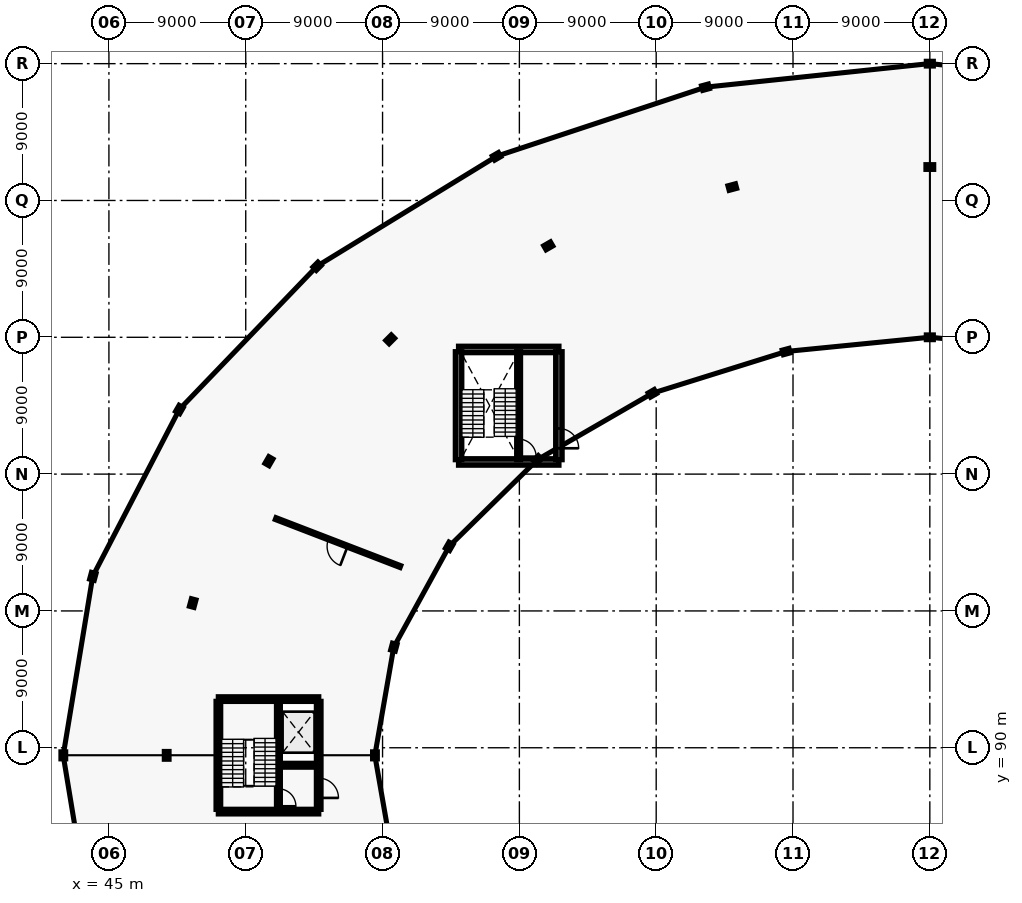
"""IFC4 building model, lengths in metres.
Left out: names, types, materials, properties, quantities, classifications, styles, units other than length and angle.
Written with IfcOpenShell. Run it as: python <this file> out.ifc"""

import sys

from ifc_helpers import new_model, si_unit, direction, frame, frame_2d, origin, origin_2d, place, context, subcontext, project, spatial, rectangle, i_section, extrude, element, fill, save


model = new_model("IFC4")
c1 = context("Model", 3, precision=1e-05, world=origin(), true_north=direction((0.0, 1.0)))
c2 = subcontext(c1, "Body", "Model", "MODEL_VIEW")
j1 = project(units=[si_unit("LENGTHUNIT", "METRE"), si_unit("PLANEANGLEUNIT", "RADIAN")], contexts=[c1])
p1 = place(None, origin())
s1 = spatial("IfcSite", under=j1, at=p1, CompositionType="ELEMENT")
p2 = place(p1, origin())
s2 = spatial("IfcBuilding", under=s1, at=p2, CompositionType="ELEMENT")
p3 = place(p2, frame((0.0, 0.0, 5.4)))
s3 = spatial("IfcBuildingStorey", under=s2, at=p3, CompositionType="ELEMENT", Elevation=5.4)
p4 = place(p3, frame((99.0, 117.0, 0.0), z_axis=(0.0, 0.0, 1.0), x_axis=(0.0, 1.0, 0.0)))
e1 = element("IfcColumn", 1, at=p4, inside=s3, PredefinedType="COLUMN", context=c2, shape_type="SweptSolid", body=[
    extrude(i_section(OverallWidth=0.3, OverallDepth=0.45, WebThickness=0.014, FlangeThickness=0.026, FilletRadius=0.027, at=origin_2d()), origin(), (0.0, 0.0, 1.0), 4.2),
])
p5 = place(p3, frame((99.0, 128.2, 0.0), z_axis=(0.0, 0.0, 1.0), x_axis=(0.0, 1.0, 0.0)))
e2 = element("IfcColumn", 2, at=p5, inside=s3, PredefinedType="COLUMN", context=c2, shape_type="SweptSolid", body=[
    extrude(i_section(OverallWidth=0.3, OverallDepth=0.5, WebThickness=0.014, FlangeThickness=0.028, FilletRadius=0.027, at=origin_2d()), origin(), (0.0, 0.0, 1.0), 4.2),
])
p6 = place(p3, frame((99.0, 135.0, 0.0), z_axis=(0.0, 0.0, 1.0), x_axis=(0.0, 1.0, 0.0)))
e3 = element("IfcColumn", 3, at=p6, inside=s3, PredefinedType="COLUMN", context=c2, shape_type="SweptSolid", body=[
    extrude(i_section(OverallWidth=0.3, OverallDepth=0.45, WebThickness=0.014, FlangeThickness=0.026, FilletRadius=0.027, at=origin_2d()), origin(), (0.0, 0.0, 1.0), 4.18),
])
p7 = place(p3, frame((89.553, 116.063, 0.0), z_axis=(0.0, 0.0, 1.0), x_axis=(-0.258819045103, 0.965925826289, 0.0)))
e4 = element("IfcColumn", 4, at=p7, inside=s3, PredefinedType="COLUMN", context=c2, shape_type="SweptSolid", body=[
    extrude(i_section(OverallWidth=0.3, OverallDepth=0.45, WebThickness=0.014, FlangeThickness=0.026, FilletRadius=0.027, at=origin_2d()), origin(), (0.0, 0.0, 1.0), 4.2),
])
p8 = place(p3, frame((86.007, 126.881, 0.0), z_axis=(0.0, 0.0, 1.0), x_axis=(-0.258819045103, 0.965925826289, 0.0)))
e5 = element("IfcColumn", 5, at=p8, inside=s3, PredefinedType="COLUMN", context=c2, shape_type="SweptSolid", body=[
    extrude(i_section(OverallWidth=0.3, OverallDepth=0.5, WebThickness=0.014, FlangeThickness=0.028, FilletRadius=0.027, at=origin_2d()), origin(), (0.0, 0.0, 1.0), 4.2),
])
p9 = place(p3, frame((84.247, 133.45, 0.0), z_axis=(0.0, 0.0, 1.0), x_axis=(-0.258819045103, 0.965925826289, 0.0)))
e6 = element("IfcColumn", 6, at=p9, inside=s3, PredefinedType="COLUMN", context=c2, shape_type="SweptSolid", body=[
    extrude(i_section(OverallWidth=0.3, OverallDepth=0.45, WebThickness=0.014, FlangeThickness=0.026, FilletRadius=0.027, at=origin_2d()), origin(), (0.0, 0.0, 1.0), 4.18),
])
p10 = place(p3, frame((80.75, 113.316, 0.0), z_axis=(0.0, 0.0, 1.0), x_axis=(-0.5, 0.866025403784, 0.0)))
e7 = element("IfcColumn", 7, at=p10, inside=s3, PredefinedType="COLUMN", context=c2, shape_type="SweptSolid", body=[
    extrude(i_section(OverallWidth=0.3, OverallDepth=0.45, WebThickness=0.014, FlangeThickness=0.026, FilletRadius=0.027, at=origin_2d()), origin(), (0.0, 0.0, 1.0), 4.2),
])
p11 = place(p3, frame((73.9, 123.015, 0.0), z_axis=(0.0, 0.0, 1.0), x_axis=(-0.5, 0.866025403784, 0.0)))
e8 = element("IfcColumn", 8, at=p11, inside=s3, PredefinedType="COLUMN", context=c2, shape_type="SweptSolid", body=[
    extrude(i_section(OverallWidth=0.3, OverallDepth=0.5, WebThickness=0.014, FlangeThickness=0.028, FilletRadius=0.027, at=origin_2d()), origin(), (0.0, 0.0, 1.0), 4.2),
])
p12 = place(p3, frame((70.5, 128.904, 0.0), z_axis=(0.0, 0.0, 1.0), x_axis=(-0.5, 0.866025403784, 0.0)))
e9 = element("IfcColumn", 9, at=p12, inside=s3, PredefinedType="COLUMN", context=c2, shape_type="SweptSolid", body=[
    extrude(i_section(OverallWidth=0.3, OverallDepth=0.45, WebThickness=0.014, FlangeThickness=0.026, FilletRadius=0.027, at=origin_2d()), origin(), (0.0, 0.0, 1.0), 4.18),
])
p13 = place(p3, frame((73.191, 108.945, 0.0), z_axis=(0.0, 0.0, 1.0), x_axis=(-0.707106781187, 0.707106781187, 0.0)))
e10 = element("IfcColumn", 10, at=p13, inside=s3, PredefinedType="COLUMN", context=c2, shape_type="SweptSolid", body=[
    extrude(i_section(OverallWidth=0.3, OverallDepth=0.45, WebThickness=0.014, FlangeThickness=0.026, FilletRadius=0.027, at=origin_2d()), origin(), (0.0, 0.0, 1.0), 4.2),
])
p14 = place(p3, frame((63.503, 116.865, 0.0), z_axis=(0.0, 0.0, 1.0), x_axis=(-0.707106781187, 0.707106781187, 0.0)))
e11 = element("IfcColumn", 11, at=p14, inside=s3, PredefinedType="COLUMN", context=c2, shape_type="SweptSolid", body=[
    extrude(i_section(OverallWidth=0.3, OverallDepth=0.5, WebThickness=0.014, FlangeThickness=0.028, FilletRadius=0.027, at=origin_2d()), origin(), (0.0, 0.0, 1.0), 4.2),
])
p15 = place(p3, frame((58.695, 121.673, 0.0), z_axis=(0.0, 0.0, 1.0), x_axis=(-0.707106781187, 0.707106781187, 0.0)))
e12 = element("IfcColumn", 12, at=p15, inside=s3, PredefinedType="COLUMN", context=c2, shape_type="SweptSolid", body=[
    extrude(i_section(OverallWidth=0.3, OverallDepth=0.45, WebThickness=0.014, FlangeThickness=0.026, FilletRadius=0.027, at=origin_2d()), origin(), (0.0, 0.0, 1.0), 4.18),
])
p16 = place(p3, frame((67.39, 103.25, 0.0), z_axis=(0.0, 0.0, 1.0), x_axis=(-0.866025403784, 0.5, 0.0)))
e13 = element("IfcColumn", 13, at=p16, inside=s3, PredefinedType="COLUMN", context=c2, shape_type="SweptSolid", body=[
    extrude(i_section(OverallWidth=0.3, OverallDepth=0.45, WebThickness=0.014, FlangeThickness=0.026, FilletRadius=0.027, at=origin_2d()), origin(), (0.0, 0.0, 1.0), 4.2),
])
p17 = place(p3, frame((55.526, 108.85, 0.0), z_axis=(0.0, 0.0, 1.0), x_axis=(-0.866025403784, 0.5, 0.0)))
e14 = element("IfcColumn", 14, at=p17, inside=s3, PredefinedType="COLUMN", context=c2, shape_type="SweptSolid", body=[
    extrude(i_section(OverallWidth=0.3, OverallDepth=0.5, WebThickness=0.014, FlangeThickness=0.028, FilletRadius=0.027, at=origin_2d()), origin(), (0.0, 0.0, 1.0), 4.2),
])
p18 = place(p3, frame((49.637, 112.25, 0.0), z_axis=(0.0, 0.0, 1.0), x_axis=(-0.866025403784, 0.5, 0.0)))
e15 = element("IfcColumn", 15, at=p18, inside=s3, PredefinedType="COLUMN", context=c2, shape_type="SweptSolid", body=[
    extrude(i_section(OverallWidth=0.3, OverallDepth=0.45, WebThickness=0.014, FlangeThickness=0.026, FilletRadius=0.027, at=origin_2d()), origin(), (0.0, 0.0, 1.0), 4.18),
])
p19 = place(p3, frame((63.744, 96.618, 0.0), z_axis=(0.0, 0.0, 1.0), x_axis=(-0.965925826289, 0.258819045103, 0.0)))
e16 = element("IfcColumn", 16, at=p19, inside=s3, PredefinedType="COLUMN", context=c2, shape_type="SweptSolid", body=[
    extrude(i_section(OverallWidth=0.3, OverallDepth=0.45, WebThickness=0.014, FlangeThickness=0.026, FilletRadius=0.027, at=origin_2d()), origin(), (0.0, 0.0, 1.0), 4.2),
])
p20 = place(p3, frame((50.511, 99.516, 0.0), z_axis=(0.0, 0.0, 1.0), x_axis=(-0.965925826289, 0.258819045103, 0.0)))
e17 = element("IfcColumn", 17, at=p20, inside=s3, PredefinedType="COLUMN", context=c2, shape_type="SweptSolid", body=[
    extrude(i_section(OverallWidth=0.3, OverallDepth=0.5, WebThickness=0.014, FlangeThickness=0.028, FilletRadius=0.027, at=origin_2d()), origin(), (0.0, 0.0, 1.0), 4.2),
])
p21 = place(p3, frame((43.942, 101.276, 0.0), z_axis=(0.0, 0.0, 1.0), x_axis=(-0.965925826289, 0.258819045103, 0.0)))
e18 = element("IfcColumn", 18, at=p21, inside=s3, PredefinedType="COLUMN", context=c2, shape_type="SweptSolid", body=[
    extrude(i_section(OverallWidth=0.3, OverallDepth=0.45, WebThickness=0.014, FlangeThickness=0.026, FilletRadius=0.027, at=origin_2d()), origin(), (0.0, 0.0, 1.0), 4.18),
])
p22 = place(p3, frame((62.5, 89.5, 0.0), z_axis=(0.0, 0.0, 1.0), x_axis=(-1.0, 0.0, 0.0)))
e19 = element("IfcColumn", 19, at=p22, inside=s3, PredefinedType="COLUMN", context=c2, shape_type="SweptSolid", body=[
    extrude(i_section(OverallWidth=0.3, OverallDepth=0.45, WebThickness=0.014, FlangeThickness=0.026, FilletRadius=0.027, at=origin_2d()), origin(), (0.0, 0.0, 1.0), 4.2),
])
p23 = place(p3, frame((48.8, 89.5, 0.0), z_axis=(0.0, 0.0, 1.0), x_axis=(-1.0, 0.0, 0.0)))
e20 = element("IfcColumn", 20, at=p23, inside=s3, PredefinedType="COLUMN", context=c2, shape_type="SweptSolid", body=[
    extrude(i_section(OverallWidth=0.3, OverallDepth=0.5, WebThickness=0.014, FlangeThickness=0.028, FilletRadius=0.027, at=origin_2d()), origin(), (0.0, 0.0, 1.0), 4.2),
])
p24 = place(p3, frame((42.0, 89.5, 0.0), z_axis=(0.0, 0.0, 1.0), x_axis=(-1.0, 0.0, 0.0)))
e21 = element("IfcColumn", 21, at=p24, inside=s3, PredefinedType="COLUMN", context=c2, shape_type="SweptSolid", body=[
    extrude(i_section(OverallWidth=0.3, OverallDepth=0.45, WebThickness=0.014, FlangeThickness=0.026, FilletRadius=0.027, at=origin_2d()), origin(), (0.0, 0.0, 1.0), 4.18),
])
for number, where, z_axis, x_axis in (
    (22, (52.2, 85.8, 0.0), (0.0, 0.0, 1.0), (1.0, 0.0, 0.0)),
    (23, (52.2, 93.2, 0.0), (0.0, 0.0, 1.0), (1.0, 0.0, 0.0)),
):
    element("IfcWall", number, at=place(p3, frame(where, z_axis=z_axis, x_axis=x_axis)), inside=s3, PredefinedType="SHEAR", context=c2, shape_type="SweptSolid", body=[
        extrude(rectangle(XDim=6.6, YDim=0.3, at=frame_2d((3.3, 0.0))), origin(), (0.0, 0.0, 1.0), 4.2),
    ])
p25 = place(p3, frame((52.2, 85.95, 0.0), z_axis=(0.0, 0.0, 1.0), x_axis=(0.0, 1.0, 0.0)))
e24 = element("IfcWall", 24, at=p25, inside=s3, PredefinedType="SHEAR", context=c2, shape_type="SweptSolid", body=[
    extrude(rectangle(XDim=7.1, YDim=0.3, at=frame_2d((3.55, 0.0))), origin(), (0.0, 0.0, 1.0), 4.2),
])
p26 = place(p3, frame((58.8, 85.95, 0.0), z_axis=(0.0, 0.0, 1.0), x_axis=(0.0, 1.0, 0.0)))
e25 = element("IfcWall", 25, at=p26, inside=s3, PredefinedType="SHEAR", context=c2, shape_type="SweptSolid", body=[
    extrude(rectangle(XDim=7.1, YDim=0.3, at=frame_2d((3.55, 0.0))), origin(), (0.0, 0.0, 1.0), 4.2),
])
p27 = place(p26, frame((0.75, 0.0, 0.0)))
e26 = element("IfcOpeningElement", 26, at=p27, cuts=e25, PredefinedType="OPENING", context=c2, shape_type="SweptSolid", body=[
    extrude(rectangle(XDim=1.3, YDim=2.15, at=frame_2d((0.65, 1.075))), frame((0.0, 0.16, 0.0), z_axis=(0.0, -1.0, 0.0), x_axis=(1.0, 0.0, 0.0)), (0.0, 0.0, 1.0), 0.32),
])
p28 = place(p3, frame((56.15, 85.95, 0.0), z_axis=(0.0, 0.0, 1.0), x_axis=(0.0, 1.0, 0.0)))
e27 = element("IfcWall", 27, at=p28, inside=s3, PredefinedType="SHEAR", context=c2, shape_type="SweptSolid", body=[
    extrude(rectangle(XDim=7.1, YDim=0.25, at=frame_2d((3.55, 0.0))), origin(), (0.0, 0.0, 1.0), 4.2),
])
p29 = place(p28, frame((0.2, 0.0, 0.0)))
e28 = element("IfcOpeningElement", 28, at=p29, cuts=e27, PredefinedType="OPENING", context=c2, shape_type="SweptSolid", body=[
    extrude(rectangle(XDim=1.15, YDim=2.15, at=frame_2d((0.575, 1.075))), frame((0.0, 0.135, 0.0), z_axis=(0.0, -1.0, 0.0), x_axis=(1.0, 0.0, 0.0)), (0.0, 0.0, 1.0), 0.27),
])
p30 = place(p3, frame((56.27, 88.85, 0.0), z_axis=(0.0, 0.0, 1.0), x_axis=(1.0, 0.0, 0.0)))
e29 = element("IfcWall", 29, at=p30, inside=s3, PredefinedType="SHEAR", context=c2, shape_type="SweptSolid", body=[
    extrude(rectangle(XDim=2.38, YDim=0.25, at=frame_2d((1.19, 0.0))), origin(), (0.0, 0.0, 1.0), 4.2),
])
p31 = place(p30, frame((0.39, 0.0, 0.0)))
e30 = element("IfcOpeningElement", 30, at=p31, cuts=e29, PredefinedType="OPENING", context=c2, shape_type="SweptSolid", body=[
    extrude(rectangle(XDim=1.6, YDim=2.3, at=frame_2d((0.8, 1.15))), frame((0.0, 0.135, 0.0), z_axis=(0.0, -1.0, 0.0), x_axis=(1.0, 0.0, 0.0)), (0.0, 0.0, 1.0), 0.27),
])
for number, where, z_axis, x_axis in (
    (31, (68.0, 108.8, 0.0), (0.0, 0.0, 1.0), (1.0, 0.0, 0.0)),
    (32, (68.0, 116.2, 0.0), (0.0, 0.0, 1.0), (1.0, 0.0, 0.0)),
):
    element("IfcWall", number, at=place(p3, frame(where, z_axis=z_axis, x_axis=x_axis)), inside=s3, PredefinedType="SHEAR", context=c2, shape_type="SweptSolid", body=[
        extrude(rectangle(XDim=6.6, YDim=0.42, at=frame_2d((3.3, 0.0))), origin(), (0.0, 0.0, 1.0), 4.2),
    ])
p32 = place(p3, frame((68.0, 108.95, 0.0), z_axis=(0.0, 0.0, 1.0), x_axis=(0.0, 1.0, 0.0)))
e33 = element("IfcWall", 33, at=p32, inside=s3, PredefinedType="SHEAR", context=c2, shape_type="SweptSolid", body=[
    extrude(rectangle(XDim=7.1, YDim=0.42, at=frame_2d((3.55, 0.0))), origin(), (0.0, 0.0, 1.0), 4.2),
])
p33 = place(p3, frame((74.6, 108.95, 0.0), z_axis=(0.0, 0.0, 1.0), x_axis=(0.0, 1.0, 0.0)))
e34 = element("IfcWall", 34, at=p33, inside=s3, PredefinedType="SHEAR", context=c2, shape_type="SweptSolid", body=[
    extrude(rectangle(XDim=7.1, YDim=0.42, at=frame_2d((3.55, 0.0))), origin(), (0.0, 0.0, 1.0), 4.2),
])
p34 = place(p33, frame((0.75, 0.0, 0.0)))
e35 = element("IfcOpeningElement", 35, at=p34, cuts=e34, PredefinedType="OPENING", context=c2, shape_type="SweptSolid", body=[
    extrude(rectangle(XDim=1.3, YDim=2.15, at=frame_2d((0.65, 1.075))), frame((0.0, 0.22, 0.0), z_axis=(0.0, -1.0, 0.0), x_axis=(1.0, 0.0, 0.0)), (0.0, 0.0, 1.0), 0.44),
])
p35 = place(p3, frame((71.95, 108.95, 0.0), z_axis=(0.0, 0.0, 1.0), x_axis=(0.0, 1.0, 0.0)))
e36 = element("IfcWall", 36, at=p35, inside=s3, PredefinedType="SHEAR", context=c2, shape_type="SweptSolid", body=[
    extrude(rectangle(XDim=7.1, YDim=0.25, at=frame_2d((3.55, 0.0))), origin(), (0.0, 0.0, 1.0), 4.2),
])
p36 = place(p35, frame((0.2, 0.0, 0.0)))
e37 = element("IfcOpeningElement", 37, at=p36, cuts=e36, PredefinedType="OPENING", context=c2, shape_type="SweptSolid", body=[
    extrude(rectangle(XDim=1.15, YDim=2.15, at=frame_2d((0.575, 1.075))), frame((0.0, 0.135, 0.0), z_axis=(0.0, -1.0, 0.0), x_axis=(1.0, 0.0, 0.0)), (0.0, 0.0, 1.0), 0.27),
])
p37 = place(p3, frame((64.17, 101.918, 0.0), z_axis=(0.0, 0.0, 1.0), x_axis=(-0.933238808021, 0.359256631399, 0.0)))
e38 = element("IfcWall", 38, at=p37, inside=s3, PredefinedType="PARTITIONING", context=c2, shape_type="SweptSolid", body=[
    extrude(rectangle(XDim=8.782, YDim=0.12, at=frame_2d((4.391, 0.0))), origin(), (0.0, 0.0, 1.0), 3.2),
])
p38 = place(p37, frame((3.716, 0.0, 0.0)))
e39 = element("IfcOpeningElement", 39, at=p38, cuts=e38, PredefinedType="OPENING", context=c2, shape_type="SweptSolid", body=[
    extrude(rectangle(XDim=1.35, YDim=2.2, at=frame_2d((0.675, 1.1))), frame((0.0, 0.07, 0.0), z_axis=(0.0, -1.0, 0.0), x_axis=(1.0, 0.0, 0.0)), (0.0, 0.0, 1.0), 0.14),
])
p39 = place(p27, frame((1.3, 0.0, 0.0), z_axis=(0.0, 0.0, 1.0), x_axis=(-1.0, 0.0, 0.0)))
e40 = element("IfcDoor", 40, at=p39, inside=s3, OperationType="DOUBLE_DOOR_SINGLE_SWING", PredefinedType="DOOR", context=c2, shape_type="SweptSolid", body=[
    extrude(rectangle(XDim=1.3, YDim=2.15, at=frame_2d((0.65, 1.075))), frame((0.0, 0.025, 0.0), z_axis=(0.0, -1.0, 0.0), x_axis=(1.0, 0.0, 0.0)), (0.0, 0.0, 1.0), 0.05),
])
fill(e26, e40)
p40 = place(p29, frame((1.15, 0.0, 0.0), z_axis=(0.0, 0.0, 1.0), x_axis=(-1.0, 0.0, 0.0)))
e41 = element("IfcDoor", 41, at=p40, inside=s3, OperationType="SINGLE_SWING_LEFT", PredefinedType="DOOR", context=c2, shape_type="SweptSolid", body=[
    extrude(rectangle(XDim=1.15, YDim=2.15, at=frame_2d((0.575, 1.075))), frame((0.0, 0.025, 0.0), z_axis=(0.0, -1.0, 0.0), x_axis=(1.0, 0.0, 0.0)), (0.0, 0.0, 1.0), 0.05),
])
fill(e28, e41)
p41 = place(p31, origin())
e42 = element("IfcDoor", 42, at=p41, inside=s3, OperationType="SLIDING_TO_LEFT", PredefinedType="DOOR", context=c2, shape_type="SweptSolid", body=[
    extrude(rectangle(XDim=1.6, YDim=2.3, at=frame_2d((0.8, 1.15))), frame((0.0, 0.025, 0.0), z_axis=(0.0, -1.0, 0.0), x_axis=(1.0, 0.0, 0.0)), (0.0, 0.0, 1.0), 0.05),
])
fill(e30, e42)
p42 = place(p34, frame((1.3, 0.0, 0.0), z_axis=(0.0, 0.0, 1.0), x_axis=(-1.0, 0.0, 0.0)))
e43 = element("IfcDoor", 43, at=p42, inside=s3, OperationType="DOUBLE_DOOR_SINGLE_SWING", PredefinedType="DOOR", context=c2, shape_type="SweptSolid", body=[
    extrude(rectangle(XDim=1.3, YDim=2.15, at=frame_2d((0.65, 1.075))), frame((0.0, 0.025, 0.0), z_axis=(0.0, -1.0, 0.0), x_axis=(1.0, 0.0, 0.0)), (0.0, 0.0, 1.0), 0.05),
])
fill(e35, e43)
p43 = place(p36, frame((1.15, 0.0, 0.0), z_axis=(0.0, 0.0, 1.0), x_axis=(-1.0, 0.0, 0.0)))
e44 = element("IfcDoor", 44, at=p43, inside=s3, OperationType="SINGLE_SWING_LEFT", PredefinedType="DOOR", context=c2, shape_type="SweptSolid", body=[
    extrude(rectangle(XDim=1.15, YDim=2.15, at=frame_2d((0.575, 1.075))), frame((0.0, 0.025, 0.0), z_axis=(0.0, -1.0, 0.0), x_axis=(1.0, 0.0, 0.0)), (0.0, 0.0, 1.0), 0.05),
])
fill(e37, e44)
p44 = place(p38, origin())
e45 = element("IfcDoor", 45, at=p44, inside=s3, OperationType="SINGLE_SWING_LEFT", PredefinedType="DOOR", context=c2, shape_type="SweptSolid", body=[
    extrude(rectangle(XDim=1.35, YDim=2.2, at=frame_2d((0.675, 1.1))), frame((0.0, 0.025, 0.0), z_axis=(0.0, -1.0, 0.0), x_axis=(1.0, 0.0, 0.0)), (0.0, 0.0, 1.0), 0.05),
])
fill(e39, e45)
save(model, sys.argv[1])
